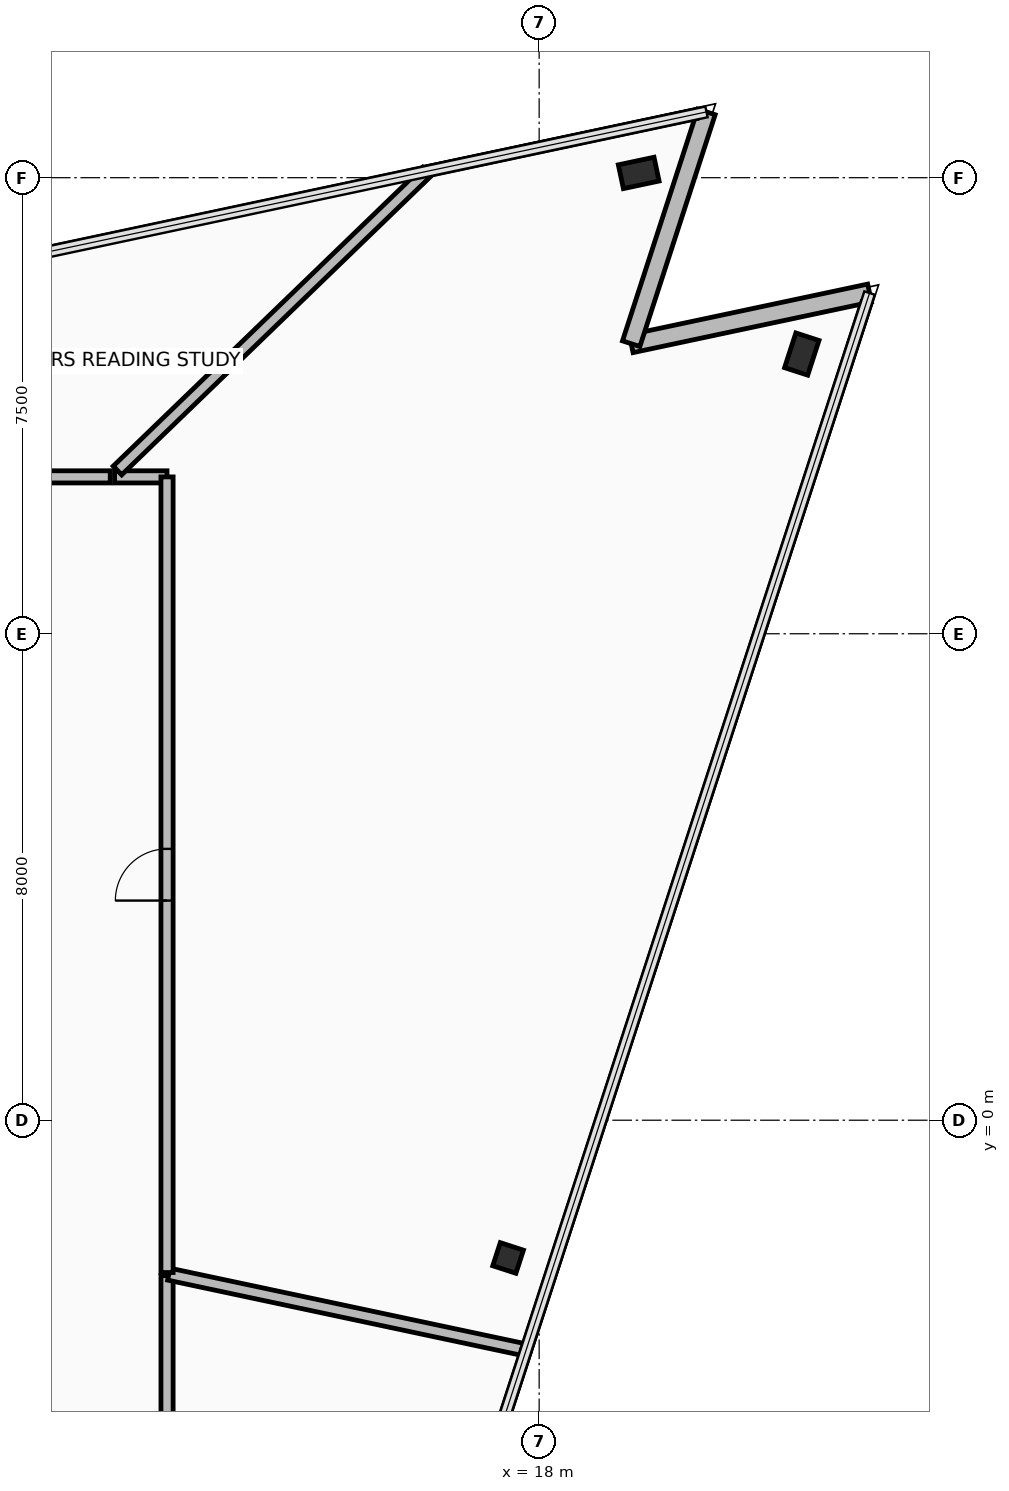
"""IFC4 building model, lengths in metres.
Left out: names, types, materials, properties, quantities, classifications, styles, units other than length and angle.
Written with IfcOpenShell. Run it as: python <this file> out.ifc"""

import sys

from ifc_helpers import new_model, si_unit, direction, frame, frame_2d, origin, origin_2d, place, context, subcontext, project, spatial, rectangle, hollow_rectangle, extrude, element, fill, save


model = new_model("IFC4")
c1 = context("Model", 3, precision=1e-05, world=origin(), true_north=direction((0.0, 1.0)))
c2 = subcontext(c1, "Body", "Model", "MODEL_VIEW")
j1 = project(units=[si_unit("LENGTHUNIT", "METRE"), si_unit("PLANEANGLEUNIT", "RADIAN")], contexts=[c1])
p1 = place(None, origin())
s1 = spatial("IfcSite", under=j1, at=p1, CompositionType="ELEMENT")
p2 = place(p1, origin())
s2 = spatial("IfcBuilding", under=s1, at=p2, CompositionType="ELEMENT")
p3 = place(p2, frame((0.0, 0.0, 290.7)))
s3 = spatial("IfcBuildingStorey", under=s2, at=p3, CompositionType="ELEMENT", Elevation=290.7)
p4 = place(p3, frame((17.489, -2.265, 0.0), z_axis=(0.0, 0.0, 1.0), x_axis=(0.309018654281, 0.951055976957, 0.0)))
e1 = element("IfcColumn", 1, at=p4, inside=s3, PredefinedType="COLUMN", context=c2, shape_type="SweptSolid", body=[
    extrude(hollow_rectangle(XDim=0.4, YDim=0.4, WallThickness=0.025, at=origin_2d()), origin(), (0.0, 0.0, 1.0), 3.65),
])
for number, where, z_axis, x_axis in (
    (2, (22.319, 12.6, 0.0), (0.0, 0.0, 1.0), (0.309, 0.951, 0.0)),
    (3, (19.637, 15.578, 0.0), (0.0, 0.0, 1.0), (0.978, 0.208, 0.0)),
):
    element("IfcColumn", number, at=place(p3, frame(where, z_axis=z_axis, x_axis=x_axis)), inside=s3, PredefinedType="COLUMN", context=c2, shape_type="SweptSolid", body=[
        extrude(hollow_rectangle(XDim=0.4, YDim=0.6, WallThickness=0.03, at=origin_2d()), origin(), (0.0, 0.0, 1.0), 3.65),
    ])
p5 = place(p3, frame((23.434, 13.603, 0.0), z_axis=(0.0, 0.0, 1.0), x_axis=(-0.97815049033, -0.207898095871, 0.0)))
e4 = element("IfcWall", 4, at=p5, inside=s3, PredefinedType="STANDARD", context=c2, shape_type="SweptSolid", body=[
    extrude(rectangle(XDim=4.008, YDim=0.3, at=frame_2d((2.004, 0.0))), origin(), (0.0, 0.0, 1.0), 2.81),
])
p6 = place(p3, frame((19.513, 12.77, 0.0), z_axis=(0.0, 0.0, 1.0), x_axis=(0.309018580232, 0.951056001018, 0.0)))
e5 = element("IfcWall", 5, at=p6, inside=s3, PredefinedType="STANDARD", context=c2, shape_type="SweptSolid", body=[
    extrude(rectangle(XDim=4.008, YDim=0.3, at=frame_2d((2.004, 0.0))), origin(), (0.0, 0.0, 1.0), 2.81),
])
p7 = place(p3, frame((11.88, -10.579, 0.0), z_axis=(0.0, 0.0, 1.0), x_axis=(0.0, 1.0, 0.0)))
e6 = element("IfcWall", 6, at=p7, inside=s3, PredefinedType="PARTITIONING", context=c2, shape_type="SweptSolid", body=[
    extrude(rectangle(XDim=8.023, YDim=0.2, at=frame_2d((4.012, 0.0))), origin(), (0.0, 0.0, 1.0), 2.96),
])
p8 = place(p3, frame((11.91, -2.531, 0.0), z_axis=(0.0, 0.0, 1.0), x_axis=(0.978144111738, -0.207928104574, 0.0)))
e7 = element("IfcWall", 7, at=p8, inside=s3, PredefinedType="PARTITIONING", context=c2, shape_type="SweptSolid", body=[
    extrude(rectangle(XDim=5.979, YDim=0.2, at=frame_2d((2.989, 0.0))), origin(), (0.0, 0.0, 1.0), 2.81),
])
p9 = place(p3, frame((17.777, -3.807, 0.0), z_axis=(0.0, 0.0, 1.0), x_axis=(-0.309024581215, -0.951054051148, 0.0)))
e8 = element("IfcWall", 8, at=p9, inside=s3, PredefinedType="PARTITIONING", context=c2, shape_type="SweptSolid", body=[
    extrude(rectangle(XDim=30.614, YDim=0.15, at=frame_2d((15.307, 0.0))), origin(), (0.0, 0.0, 1.0), 3.465),
])
p10 = place(p3, frame((11.879, 10.58, 0.0), z_axis=(0.0, 0.0, 1.0), x_axis=(-1.0, 0.0, 0.0)))
e9 = element("IfcWall", 9, at=p10, inside=s3, PredefinedType="PARTITIONING", context=c2, shape_type="SweptSolid", body=[
    extrude(rectangle(XDim=0.862, YDim=0.2, at=frame_2d((0.431, 0.0))), origin(), (0.0, 0.0, 1.0), 3.465),
])
p11 = place(p3, frame((11.065, 10.685, 0.0), z_axis=(0.0, 0.0, 1.0), x_axis=(0.719349741171, 0.694648076278, 0.0)))
e10 = element("IfcWall", 10, at=p11, inside=s3, PredefinedType="PARTITIONING", context=c2, shape_type="SweptSolid", body=[
    extrude(rectangle(XDim=7.077, YDim=0.2, at=frame_2d((3.538, 0.0))), origin(), (0.0, 0.0, 1.0), 2.81),
])
p12 = place(p3, frame((16.167, 15.607, 0.0), z_axis=(0.0, 0.0, 1.0), x_axis=(0.978147425174, 0.207912516762, 0.0)))
e11 = element("IfcWall", 11, at=p12, inside=s3, PredefinedType="PARTITIONING", context=c2, shape_type="SweptSolid", body=[
    extrude(rectangle(XDim=4.508, YDim=0.15, at=frame_2d((2.254, 0.0))), origin(), (0.0, 0.0, 1.0), 3.465),
])
p13 = place(p3, frame((23.379, 13.433, 0.0), z_axis=(0.0, 0.0, 1.0), x_axis=(-0.309022856951, -0.951054611409, 0.0)))
e12 = element("IfcWall", 12, at=p13, inside=s3, PredefinedType="PARTITIONING", context=c2, shape_type="SweptSolid", body=[
    extrude(rectangle(XDim=18.077, YDim=0.15, at=frame_2d((9.039, 0.0))), origin(), (0.0, 0.0, 1.0), 3.465),
])
p14 = place(p3, frame((11.88, -2.505, 0.0), z_axis=(0.0, 0.0, 1.0), x_axis=(0.0, 1.0, 0.0)))
e13 = element("IfcWall", 13, at=p14, inside=s3, PredefinedType="PARTITIONING", context=c2, shape_type="SweptSolid", body=[
    extrude(rectangle(XDim=13.084, YDim=0.2, at=frame_2d((6.542, 0.0))), origin(), (0.0, 0.0, 1.0), 2.96),
])
p15 = place(p14, frame((6.117, 0.0, 0.0)))
e14 = element("IfcOpeningElement", 14, at=p15, cuts=e13, PredefinedType="OPENING", context=c2, shape_type="SweptSolid", body=[
    extrude(rectangle(XDim=0.85, YDim=2.1, at=frame_2d((0.425, 1.05))), frame((0.0, 0.11, 0.0), z_axis=(0.0, -1.0, 0.0), x_axis=(1.0, 0.0, 0.0)), (0.0, 0.0, 1.0), 0.22),
])
p16 = place(p3, frame((10.946, 10.58, 0.0), z_axis=(0.0, 0.0, 1.0), x_axis=(-1.0, 0.0, 0.0)))
e15 = element("IfcWall", 15, at=p16, inside=s3, PredefinedType="PARTITIONING", context=c2, shape_type="SweptSolid", body=[
    extrude(rectangle(XDim=8.921, YDim=0.2, at=frame_2d((4.46, 0.0))), origin(), (0.0, 0.0, 1.0), 2.96),
])
p17 = place(p16, frame((3.96, 0.0, 0.0)))
e16 = element("IfcOpeningElement", 16, at=p17, cuts=e15, PredefinedType="OPENING", context=c2, shape_type="SweptSolid", body=[
    extrude(rectangle(XDim=1.0, YDim=2.15, at=frame_2d((0.5, 1.075))), frame((0.0, 0.11, 0.0), z_axis=(0.0, -1.0, 0.0), x_axis=(1.0, 0.0, 0.0)), (0.0, 0.0, 1.0), 0.22),
])
p18 = place(p15, origin())
e17 = element("IfcDoor", 17, at=p18, inside=s3, OperationType="SINGLE_SWING_RIGHT", PredefinedType="DOOR", context=c2, shape_type="SweptSolid", body=[
    extrude(rectangle(XDim=0.85, YDim=2.1, at=frame_2d((0.425, 1.05))), frame((0.0, 0.025, 0.0), z_axis=(0.0, -1.0, 0.0), x_axis=(1.0, 0.0, 0.0)), (0.0, 0.0, 1.0), 0.05),
])
fill(e14, e17)
save(model, sys.argv[1])
